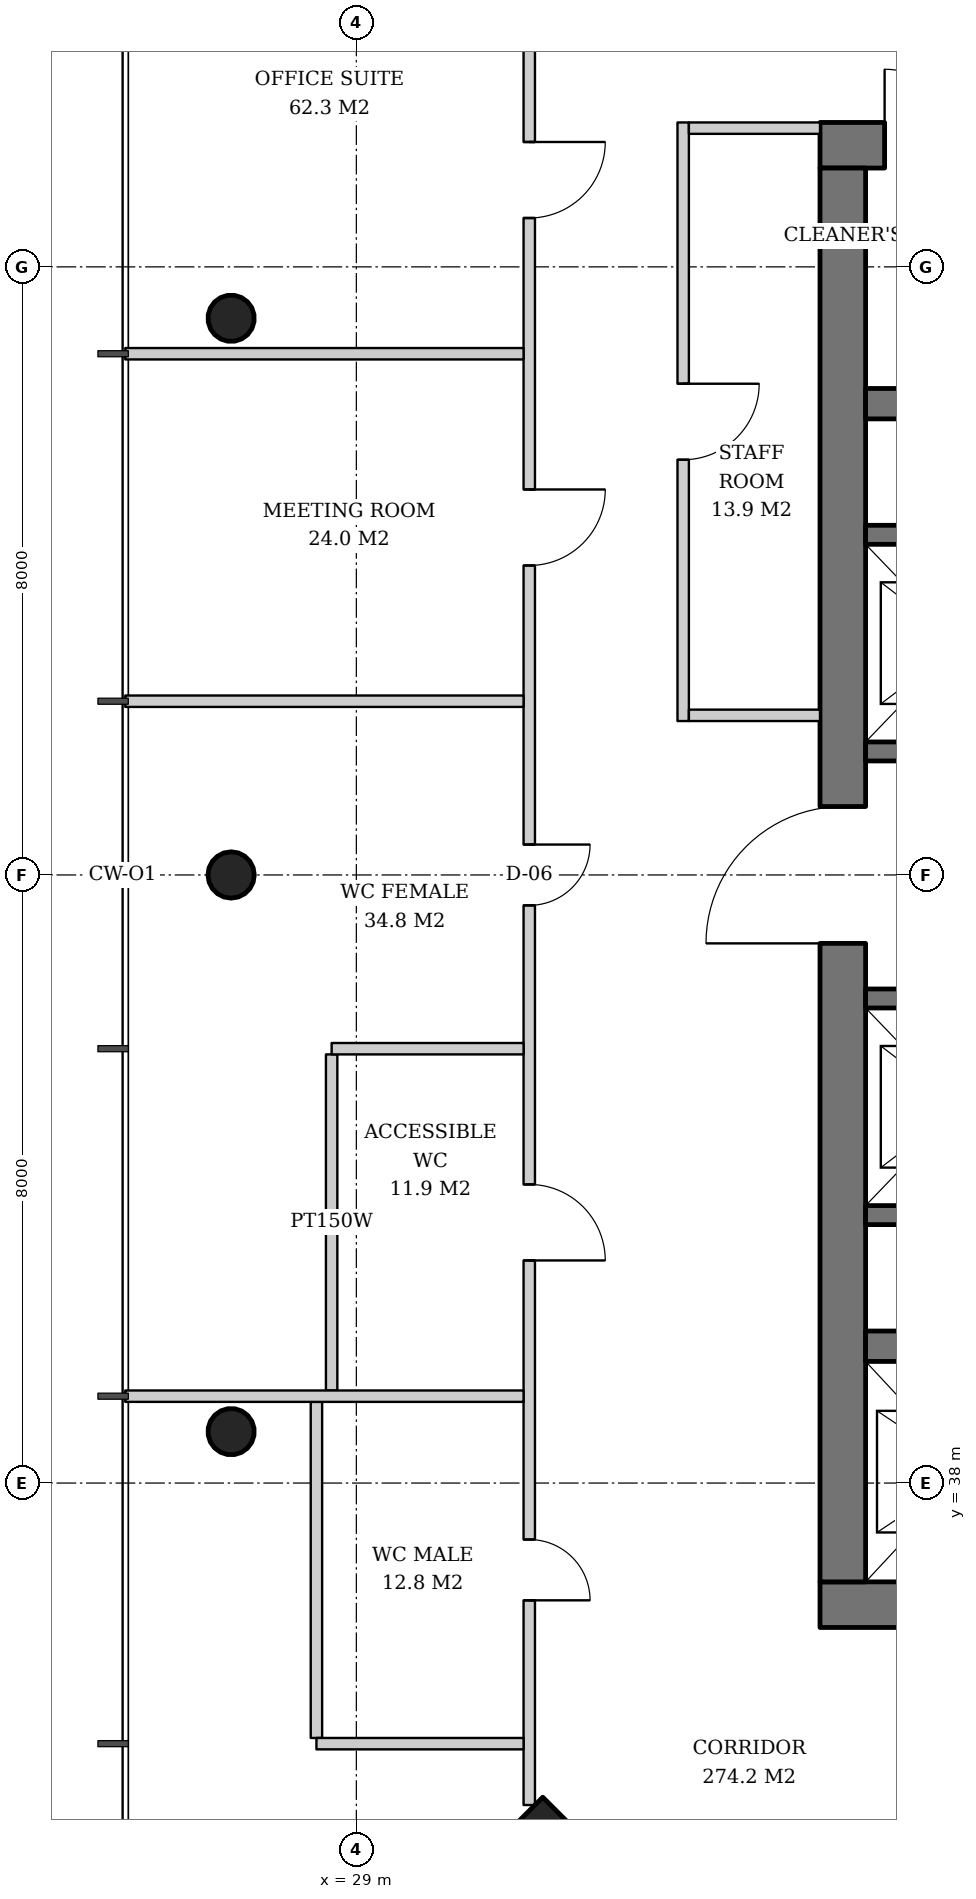
"""IFC4 building model, lengths in metres.
Left out: names, types, materials, properties, quantities, classifications, styles, units other than length and angle.
Written with IfcOpenShell. Run it as: python <this file> out.ifc"""

import sys

from ifc_helpers import new_model, si_unit, direction, frame, frame_2d, origin, origin_2d, place, context, subcontext, project, spatial, rectangle, hollow_circle, extrude, element, fill, save


model = new_model("IFC4")
c1 = context("Model", 3, precision=1e-05, world=origin(), true_north=direction((0.0, 1.0)))
c2 = subcontext(c1, "Body", "Model", "MODEL_VIEW")
j1 = project(units=[si_unit("LENGTHUNIT", "METRE"), si_unit("PLANEANGLEUNIT", "RADIAN")], contexts=[c1])
p1 = place(None, origin())
s1 = spatial("IfcSite", under=j1, at=p1, CompositionType="ELEMENT")
p2 = place(p1, origin())
s2 = spatial("IfcBuilding", under=s1, at=p2, CompositionType="ELEMENT")
p3 = place(p2, frame((0.0, 0.0, 218.6)))
s3 = spatial("IfcBuildingStorey", under=s2, at=p3, CompositionType="ELEMENT", Elevation=218.6)
p4 = place(p3, frame((31.414, 32.414, 0.0), z_axis=(0.031900153262, 0.031900153262, 0.998981861919), x_axis=(-0.707106781187, 0.707106781187, 0.0)))
e1 = element("IfcColumn", 1, at=p4, inside=s3, PredefinedType="COLUMN", context=c2, shape_type="SweptSolid", body=[
    extrude(rectangle(XDim=2.0, YDim=2.0, at=origin_2d()), origin(), (0.0, 0.0, 1.0), 3.804),
])
p5 = place(p3, frame((27.314, 53.343, 0.0), z_axis=(0.031976494272, -0.015924037308, 0.99936176075), x_axis=(0.445775033553, 0.895145027055, 0.0)))
e2 = element("IfcColumn", 2, at=p5, inside=s3, PredefinedType="COLUMN", context=c2, shape_type="SweptSolid", body=[
    extrude(hollow_circle(Radius=0.305, WallThickness=0.025, at=origin_2d()), origin(), (0.0, 0.0, 1.0), 3.802),
])
p6 = place(p3, frame((27.314, 46.0, 0.0), z_axis=(0.031980549263, 0.0, 0.999488491414), x_axis=(0.0, 1.0, 0.0)))
e3 = element("IfcColumn", 3, at=p6, inside=s3, PredefinedType="COLUMN", context=c2, shape_type="SweptSolid", body=[
    extrude(hollow_circle(Radius=0.305, WallThickness=0.025, at=origin_2d()), origin(), (0.0, 0.0, 1.0), 3.802),
])
p7 = place(p3, frame((27.314, 38.657, 0.0), z_axis=(0.031976494272, 0.015924037308, 0.99936176075), x_axis=(-0.445775033553, 0.895145027055, 0.0)))
e4 = element("IfcColumn", 4, at=p7, inside=s3, PredefinedType="COLUMN", context=c2, shape_type="SweptSolid", body=[
    extrude(hollow_circle(Radius=0.305, WallThickness=0.025, at=origin_2d()), origin(), (0.0, 0.0, 1.0), 3.802),
])
p8 = place(p3, frame((35.1, 36.4, 0.0), z_axis=(0.0, 0.0, 1.0), x_axis=(1.0, 0.0, 0.0)))
e5 = element("IfcWall", 5, at=p8, inside=s3, PredefinedType="SHEAR", context=c2, shape_type="SweptSolid", body=[
    extrude(rectangle(XDim=19.8, YDim=0.6, at=frame_2d((9.9, 0.0))), origin(), (0.0, 0.0, 1.0), 3.8),
])
p9 = place(p8, frame((3.9, 0.0, 0.0)))
e6 = element("IfcOpeningElement", 6, at=p9, cuts=e5, PredefinedType="OPENING", context=c2, shape_type="SweptSolid", body=[
    extrude(rectangle(XDim=1.0, YDim=2.1, at=frame_2d((0.5, 1.05))), frame((0.0, 0.31, 0.0), z_axis=(0.0, -1.0, 0.0), x_axis=(1.0, 0.0, 0.0)), (0.0, 0.0, 1.0), 0.62),
])
p10 = place(p8, frame((15.35, 0.0, 0.0)))
e7 = element("IfcOpeningElement", 7, at=p10, cuts=e5, PredefinedType="OPENING", context=c2, shape_type="SweptSolid", body=[
    extrude(rectangle(XDim=1.0, YDim=2.1, at=frame_2d((0.5, 1.05))), frame((0.0, 0.31, 0.0), z_axis=(0.0, -1.0, 0.0), x_axis=(1.0, 0.0, 0.0)), (0.0, 0.0, 1.0), 0.62),
])
p11 = place(p3, frame((35.1, 55.6, 0.0), z_axis=(0.0, 0.0, 1.0), x_axis=(1.0, 0.0, 0.0)))
e8 = element("IfcWall", 8, at=p11, inside=s3, PredefinedType="SHEAR", context=c2, shape_type="SweptSolid", body=[
    extrude(rectangle(XDim=19.8, YDim=0.6, at=frame_2d((9.9, 0.0))), origin(), (0.0, 0.0, 1.0), 3.8),
])
p12 = place(p11, frame((14.54, 0.0, 0.0)))
e9 = element("IfcOpeningElement", 9, at=p12, cuts=e8, PredefinedType="OPENING", context=c2, shape_type="SweptSolid", body=[
    extrude(rectangle(XDim=1.0, YDim=2.1, at=frame_2d((0.5, 1.05))), frame((0.0, 0.31, 0.0), z_axis=(0.0, -1.0, 0.0), x_axis=(1.0, 0.0, 0.0)), (0.0, 0.0, 1.0), 0.62),
])
p13 = place(p11, frame((0.85, 0.0, 0.0)))
e10 = element("IfcOpeningElement", 10, at=p13, cuts=e8, PredefinedType="OPENING", context=c2, shape_type="SweptSolid", body=[
    extrude(rectangle(XDim=1.0, YDim=2.1, at=frame_2d((0.5, 1.05))), frame((0.0, 0.31, 0.0), z_axis=(0.0, -1.0, 0.0), x_axis=(1.0, 0.0, 0.0)), (0.0, 0.0, 1.0), 0.62),
])
p14 = place(p11, frame((2.425, 0.0, 0.0)))
e11 = element("IfcOpeningElement", 11, at=p14, cuts=e8, PredefinedType="OPENING", context=c2, shape_type="SweptSolid", body=[
    extrude(rectangle(XDim=1.0, YDim=2.1, at=frame_2d((0.5, 1.05))), frame((0.0, 0.31, 0.0), z_axis=(0.0, -1.0, 0.0), x_axis=(1.0, 0.0, 0.0)), (0.0, 0.0, 1.0), 0.62),
])
p15 = place(p11, frame((4.012, 0.0, 0.0)))
e12 = element("IfcOpeningElement", 12, at=p15, cuts=e8, PredefinedType="OPENING", context=c2, shape_type="SweptSolid", body=[
    extrude(rectangle(XDim=1.0, YDim=2.1, at=frame_2d((0.5, 1.05))), frame((0.0, 0.31, 0.0), z_axis=(0.0, -1.0, 0.0), x_axis=(1.0, 0.0, 0.0)), (0.0, 0.0, 1.0), 0.62),
])
p16 = place(p3, frame((35.4, 36.7, 0.0), z_axis=(0.0, 0.0, 1.0), x_axis=(0.0, 1.0, 0.0)))
e13 = element("IfcWall", 13, at=p16, inside=s3, PredefinedType="SHEAR", context=c2, shape_type="SweptSolid", body=[
    extrude(rectangle(XDim=18.6, YDim=0.6, at=frame_2d((9.3, 0.0))), origin(), (0.0, 0.0, 1.0), 3.8),
])
p17 = place(p16, frame((8.4, 0.0, 0.0)))
e14 = element("IfcOpeningElement", 14, at=p17, cuts=e13, PredefinedType="OPENING", context=c2, shape_type="SweptSolid", body=[
    extrude(rectangle(XDim=1.8, YDim=2.4, at=frame_2d((0.9, 1.2))), frame((0.0, 0.31, 0.0), z_axis=(0.0, -1.0, 0.0), x_axis=(1.0, 0.0, 0.0)), (0.0, 0.0, 1.0), 0.62),
])
for number, where, z_axis, x_axis in (
    (15, (35.7, 39.8, 0.0), (0.0, 0.0, 1.0), (1.0, 0.0, 0.0)),
    (16, (35.7, 52.2, 0.0), (0.0, 0.0, 1.0), (1.0, 0.0, 0.0)),
):
    element("IfcWall", number, at=place(p3, frame(where, z_axis=z_axis, x_axis=x_axis)), inside=s3, PredefinedType="SHEAR", context=c2, shape_type="SweptSolid", body=[
        extrude(rectangle(XDim=18.6, YDim=0.4, at=frame_2d((9.3, 0.0))), origin(), (0.0, 0.0, 1.0), 3.8),
    ])
p18 = place(p3, frame((35.7, 50.475, 0.0), z_axis=(0.0, 0.0, 1.0), x_axis=(1.0, 0.0, 0.0)))
e17 = element("IfcWall", 17, at=p18, inside=s3, PredefinedType="SHEAR", context=c2, shape_type="SweptSolid", body=[
    extrude(rectangle(XDim=11.0, YDim=0.25, at=frame_2d((5.5, 0.0))), origin(), (0.0, 0.0, 1.0), 3.8),
])
p19 = place(p3, frame((35.7, 47.625, 0.0), z_axis=(0.0, 0.0, 1.0), x_axis=(1.0, 0.0, 0.0)))
e18 = element("IfcWall", 18, at=p19, inside=s3, PredefinedType="SHEAR", context=c2, shape_type="SweptSolid", body=[
    extrude(rectangle(XDim=12.83, YDim=0.25, at=frame_2d((6.415, 0.0))), origin(), (0.0, 0.0, 1.0), 3.8),
])
p20 = place(p19, frame((0.7, 0.0, 0.0)))
e19 = element("IfcOpeningElement", 19, at=p20, cuts=e18, PredefinedType="OPENING", context=c2, shape_type="SweptSolid", body=[
    extrude(rectangle(XDim=1.1, YDim=2.2, at=frame_2d((0.55, 1.1))), frame((0.0, 0.135, 0.0), z_axis=(0.0, -1.0, 0.0), x_axis=(1.0, 0.0, 0.0)), (0.0, 0.0, 1.0), 0.27),
])
p21 = place(p19, frame((3.45, 0.0, 0.0)))
e20 = element("IfcOpeningElement", 20, at=p21, cuts=e18, PredefinedType="OPENING", context=c2, shape_type="SweptSolid", body=[
    extrude(rectangle(XDim=1.1, YDim=2.2, at=frame_2d((0.55, 1.1))), frame((0.0, 0.135, 0.0), z_axis=(0.0, -1.0, 0.0), x_axis=(1.0, 0.0, 0.0)), (0.0, 0.0, 1.0), 0.27),
])
p22 = place(p19, frame((6.2, 0.0, 0.0)))
e21 = element("IfcOpeningElement", 21, at=p22, cuts=e18, PredefinedType="OPENING", context=c2, shape_type="SweptSolid", body=[
    extrude(rectangle(XDim=1.1, YDim=2.2, at=frame_2d((0.55, 1.1))), frame((0.0, 0.135, 0.0), z_axis=(0.0, -1.0, 0.0), x_axis=(1.0, 0.0, 0.0)), (0.0, 0.0, 1.0), 0.27),
])
p23 = place(p19, frame((9.0, 0.0, 0.0)))
e22 = element("IfcOpeningElement", 22, at=p23, cuts=e18, PredefinedType="OPENING", context=c2, shape_type="SweptSolid", body=[
    extrude(rectangle(XDim=1.0, YDim=2.1, at=frame_2d((0.5, 1.05))), frame((0.0, 0.135, 0.0), z_axis=(0.0, -1.0, 0.0), x_axis=(1.0, 0.0, 0.0)), (0.0, 0.0, 1.0), 0.27),
])
p24 = place(p19, frame((11.515, 0.0, 0.0)))
e23 = element("IfcOpeningElement", 23, at=p24, cuts=e18, PredefinedType="OPENING", context=c2, shape_type="SweptSolid", body=[
    extrude(rectangle(XDim=0.8, YDim=2.0, at=frame_2d((0.4, 1.0))), frame((0.0, 0.135, 0.0), z_axis=(0.0, -1.0, 0.0), x_axis=(1.0, 0.0, 0.0)), (0.0, 0.0, 1.0), 0.27),
])
p25 = place(p3, frame((35.7, 41.525, 0.0), z_axis=(0.0, 0.0, 1.0), x_axis=(1.0, 0.0, 0.0)))
e24 = element("IfcWall", 24, at=p25, inside=s3, PredefinedType="SHEAR", context=c2, shape_type="SweptSolid", body=[
    extrude(rectangle(XDim=11.0, YDim=0.25, at=frame_2d((5.5, 0.0))), origin(), (0.0, 0.0, 1.0), 3.8),
])
p26 = place(p3, frame((35.7, 44.375, 0.0), z_axis=(0.0, 0.0, 1.0), x_axis=(1.0, 0.0, 0.0)))
e25 = element("IfcWall", 25, at=p26, inside=s3, PredefinedType="SHEAR", context=c2, shape_type="SweptSolid", body=[
    extrude(rectangle(XDim=12.83, YDim=0.25, at=frame_2d((6.415, 0.0))), origin(), (0.0, 0.0, 1.0), 3.8),
])
p27 = place(p26, frame((0.7, 0.0, 0.0)))
e26 = element("IfcOpeningElement", 26, at=p27, cuts=e25, PredefinedType="OPENING", context=c2, shape_type="SweptSolid", body=[
    extrude(rectangle(XDim=1.1, YDim=2.2, at=frame_2d((0.55, 1.1))), frame((0.0, 0.135, 0.0), z_axis=(0.0, -1.0, 0.0), x_axis=(1.0, 0.0, 0.0)), (0.0, 0.0, 1.0), 0.27),
])
p28 = place(p26, frame((3.45, 0.0, 0.0)))
e27 = element("IfcOpeningElement", 27, at=p28, cuts=e25, PredefinedType="OPENING", context=c2, shape_type="SweptSolid", body=[
    extrude(rectangle(XDim=1.1, YDim=2.2, at=frame_2d((0.55, 1.1))), frame((0.0, 0.135, 0.0), z_axis=(0.0, -1.0, 0.0), x_axis=(1.0, 0.0, 0.0)), (0.0, 0.0, 1.0), 0.27),
])
p29 = place(p26, frame((6.2, 0.0, 0.0)))
e28 = element("IfcOpeningElement", 28, at=p29, cuts=e25, PredefinedType="OPENING", context=c2, shape_type="SweptSolid", body=[
    extrude(rectangle(XDim=1.1, YDim=2.2, at=frame_2d((0.55, 1.1))), frame((0.0, 0.135, 0.0), z_axis=(0.0, -1.0, 0.0), x_axis=(1.0, 0.0, 0.0)), (0.0, 0.0, 1.0), 0.27),
])
p30 = place(p26, frame((9.0, 0.0, 0.0)))
e29 = element("IfcOpeningElement", 29, at=p30, cuts=e25, PredefinedType="OPENING", context=c2, shape_type="SweptSolid", body=[
    extrude(rectangle(XDim=1.0, YDim=2.1, at=frame_2d((0.5, 1.05))), frame((0.0, 0.135, 0.0), z_axis=(0.0, -1.0, 0.0), x_axis=(1.0, 0.0, 0.0)), (0.0, 0.0, 1.0), 0.27),
])
p31 = place(p26, frame((11.515, 0.0, 0.0)))
e30 = element("IfcOpeningElement", 30, at=p31, cuts=e25, PredefinedType="OPENING", context=c2, shape_type="SweptSolid", body=[
    extrude(rectangle(XDim=0.8, YDim=2.0, at=frame_2d((0.4, 1.0))), frame((0.0, 0.135, 0.0), z_axis=(0.0, -1.0, 0.0), x_axis=(1.0, 0.0, 0.0)), (0.0, 0.0, 1.0), 0.27),
])
p32 = place(p3, frame((33.3, 55.9, 0.0), z_axis=(0.0, 0.0, 1.0), x_axis=(0.0, -1.0, 0.0)))
e31 = element("IfcWall", 31, at=p32, inside=s3, PredefinedType="PARTITIONING", context=c2, shape_type="SweptSolid", body=[
    extrude(rectangle(XDim=7.875, YDim=0.15, at=frame_2d((3.938, 0.0))), origin(), (0.0, 0.0, 1.0), 2.867),
])
p33 = place(p32, frame((3.438, 0.0, 0.0)))
e32 = element("IfcOpeningElement", 32, at=p33, cuts=e31, PredefinedType="OPENING", context=c2, shape_type="SweptSolid", body=[
    extrude(rectangle(XDim=1.0, YDim=2.1, at=frame_2d((0.5, 1.05))), frame((0.0, 0.085, 0.0), z_axis=(0.0, -1.0, 0.0), x_axis=(1.0, 0.0, 0.0)), (0.0, 0.0, 1.0), 0.17),
])
p34 = place(p3, frame((35.1, 55.825, 0.0), z_axis=(0.0, 0.0, 1.0), x_axis=(-1.0, 0.0, 0.0)))
e33 = element("IfcWall", 33, at=p34, inside=s3, PredefinedType="PARTITIONING", context=c2, shape_type="SweptSolid", body=[
    extrude(rectangle(XDim=1.725, YDim=0.15, at=frame_2d((0.863, 0.0))), origin(), (0.0, 0.0, 1.0), 2.92),
])
p35 = place(p3, frame((35.1, 48.1, 0.0), z_axis=(0.0, 0.0, 1.0), x_axis=(-1.0, 0.0, 0.0)))
e34 = element("IfcWall", 34, at=p35, inside=s3, PredefinedType="PARTITIONING", context=c2, shape_type="SweptSolid", body=[
    extrude(rectangle(XDim=1.725, YDim=0.15, at=frame_2d((0.863, 0.0))), origin(), (0.0, 0.0, 1.0), 3.62),
])
p36 = place(p3, frame((28.675, 43.639, 0.0), z_axis=(0.0, 0.0, 1.0), x_axis=(0.0, -1.0, 0.0)))
e35 = element("IfcWall", 35, at=p36, inside=s3, PredefinedType="PARTITIONING", context=c2, shape_type="SweptSolid", body=[
    extrude(rectangle(XDim=4.422, YDim=0.15, at=frame_2d((2.211, 0.0))), origin(), (0.0, 0.0, 1.0), 2.867),
])
p37 = place(p3, frame((28.475, 39.068, 0.0), z_axis=(0.0, 0.0, 1.0), x_axis=(0.0, -1.0, 0.0)))
e36 = element("IfcWall", 36, at=p37, inside=s3, PredefinedType="PARTITIONING", context=c2, shape_type="SweptSolid", body=[
    extrude(rectangle(XDim=4.421, YDim=0.15, at=frame_2d((2.211, 0.0))), origin(), (0.0, 0.0, 1.0), 2.867),
])
p38 = place(p3, frame((31.275, 58.236, 0.0), z_axis=(0.0, 0.0, 1.0), x_axis=(0.0, -1.0, 0.0)))
e37 = element("IfcWall", 37, at=p38, inside=s3, PredefinedType="PARTITIONING", context=c2, shape_type="SweptSolid", body=[
    extrude(rectangle(XDim=24.472, YDim=0.15, at=frame_2d((12.236, 0.0))), origin(), (0.0, 0.0, 1.0), 2.867),
])
p39 = place(p38, frame((2.593, 0.0, 0.0)))
e38 = element("IfcOpeningElement", 38, at=p39, cuts=e37, PredefinedType="OPENING", context=c2, shape_type="SweptSolid", body=[
    extrude(rectangle(XDim=1.0, YDim=2.1, at=frame_2d((0.5, 1.05))), frame((0.0, 0.085, 0.0), z_axis=(0.0, -1.0, 0.0), x_axis=(1.0, 0.0, 0.0)), (0.0, 0.0, 1.0), 0.17),
])
p40 = place(p38, frame((7.164, 0.0, 0.0)))
e39 = element("IfcOpeningElement", 39, at=p40, cuts=e37, PredefinedType="OPENING", context=c2, shape_type="SweptSolid", body=[
    extrude(rectangle(XDim=1.0, YDim=2.1, at=frame_2d((0.5, 1.05))), frame((0.0, 0.085, 0.0), z_axis=(0.0, -1.0, 0.0), x_axis=(1.0, 0.0, 0.0)), (0.0, 0.0, 1.0), 0.17),
])
p41 = place(p38, frame((11.836, 0.0, 0.0)))
e40 = element("IfcOpeningElement", 40, at=p41, cuts=e37, PredefinedType="OPENING", context=c2, shape_type="SweptSolid", body=[
    extrude(rectangle(XDim=0.8, YDim=2.1, at=frame_2d((0.4, 1.05))), frame((0.0, 0.085, 0.0), z_axis=(0.0, -1.0, 0.0), x_axis=(1.0, 0.0, 0.0)), (0.0, 0.0, 1.0), 0.17),
])
p42 = place(p38, frame((16.307, 0.0, 0.0)))
e41 = element("IfcOpeningElement", 41, at=p42, cuts=e37, PredefinedType="OPENING", context=c2, shape_type="SweptSolid", body=[
    extrude(rectangle(XDim=1.0, YDim=2.1, at=frame_2d((0.5, 1.05))), frame((0.0, 0.085, 0.0), z_axis=(0.0, -1.0, 0.0), x_axis=(1.0, 0.0, 0.0)), (0.0, 0.0, 1.0), 0.17),
])
p43 = place(p38, frame((20.979, 0.0, 0.0)))
e42 = element("IfcOpeningElement", 42, at=p43, cuts=e37, PredefinedType="OPENING", context=c2, shape_type="SweptSolid", body=[
    extrude(rectangle(XDim=0.8, YDim=2.1, at=frame_2d((0.4, 1.05))), frame((0.0, 0.085, 0.0), z_axis=(0.0, -1.0, 0.0), x_axis=(1.0, 0.0, 0.0)), (0.0, 0.0, 1.0), 0.17),
])
for number, where, z_axis, x_axis in (
    (43, (31.2, 52.857, 0.0), (0.0, 0.0, 1.0), (-1.0, 0.0, 0.0)),
    (44, (31.2, 48.286, 0.0), (0.0, 0.0, 1.0), (-1.0, 0.0, 0.0)),
):
    element("IfcWall", number, at=place(p3, frame(where, z_axis=z_axis, x_axis=x_axis)), inside=s3, PredefinedType="PARTITIONING", context=c2, shape_type="SweptSolid", body=[
        extrude(rectangle(XDim=5.24, YDim=0.15, at=frame_2d((2.62, 0.0))), origin(), (0.0, 0.0, 1.0), 3.12),
    ])
p44 = place(p3, frame((31.2, 43.714, 0.0), z_axis=(0.0, 0.0, 1.0), x_axis=(-1.0, 0.0, 0.0)))
e45 = element("IfcWall", 45, at=p44, inside=s3, PredefinedType="PARTITIONING", context=c2, shape_type="SweptSolid", body=[
    extrude(rectangle(XDim=2.525, YDim=0.15, at=frame_2d((1.262, 0.0))), origin(), (0.0, 0.0, 1.0), 3.62),
])
p45 = place(p3, frame((31.2, 39.143, 0.0), z_axis=(0.0, 0.0, 1.0), x_axis=(-1.0, 0.0, 0.0)))
e46 = element("IfcWall", 46, at=p45, inside=s3, PredefinedType="PARTITIONING", context=c2, shape_type="SweptSolid", body=[
    extrude(rectangle(XDim=5.24, YDim=0.15, at=frame_2d((2.62, 0.0))), origin(), (0.0, 0.0, 1.0), 3.12),
])
p46 = place(p3, frame((31.2, 34.572, 0.0), z_axis=(0.0, 0.0, 1.0), x_axis=(-1.0, 0.0, 0.0)))
e47 = element("IfcWall", 47, at=p46, inside=s3, PredefinedType="PARTITIONING", context=c2, shape_type="SweptSolid", body=[
    extrude(rectangle(XDim=2.725, YDim=0.15, at=frame_2d((1.362, 0.0))), origin(), (0.0, 0.0, 1.0), 3.62),
])
p47 = place(p17, origin())
e48 = element("IfcDoor", 48, at=p47, inside=s3, OperationType="DOUBLE_DOOR_SINGLE_SWING", PredefinedType="DOOR", context=c2, shape_type="SweptSolid", body=[
    extrude(rectangle(XDim=1.8, YDim=2.4, at=frame_2d((0.9, 1.2))), frame((0.0, 0.025, 0.0), z_axis=(0.0, -1.0, 0.0), x_axis=(1.0, 0.0, 0.0)), (0.0, 0.0, 1.0), 0.05),
])
fill(e14, e48)
p48 = place(p13, origin())
e49 = element("IfcDoor", 49, at=p48, inside=s3, OperationType="SINGLE_SWING_LEFT", PredefinedType="DOOR", context=c2, shape_type="SweptSolid", body=[
    extrude(rectangle(XDim=1.0, YDim=2.1, at=frame_2d((0.5, 1.05))), frame((0.0, -0.24, 0.0), z_axis=(0.0, -1.0, 0.0), x_axis=(1.0, 0.0, 0.0)), (0.0, 0.0, 1.0), 0.05),
])
fill(e10, e49)
p49 = place(p33, origin())
e50 = element("IfcDoor", 50, at=p49, inside=s3, OperationType="SINGLE_SWING_LEFT", PredefinedType="DOOR", context=c2, shape_type="SweptSolid", body=[
    extrude(rectangle(XDim=1.0, YDim=2.1, at=frame_2d((0.5, 1.05))), frame((0.0, 0.025, 0.0), z_axis=(0.0, -1.0, 0.0), x_axis=(1.0, 0.0, 0.0)), (0.0, 0.0, 1.0), 0.05),
])
fill(e32, e50)
p50 = place(p39, origin())
e51 = element("IfcDoor", 51, at=p50, inside=s3, OperationType="SINGLE_SWING_LEFT", PredefinedType="DOOR", context=c2, shape_type="SweptSolid", body=[
    extrude(rectangle(XDim=1.0, YDim=2.1, at=frame_2d((0.5, 1.05))), frame((0.0, 0.025, 0.0), z_axis=(0.0, -1.0, 0.0), x_axis=(1.0, 0.0, 0.0)), (0.0, 0.0, 1.0), 0.05),
])
fill(e38, e51)
p51 = place(p40, origin())
e52 = element("IfcDoor", 52, at=p51, inside=s3, OperationType="SINGLE_SWING_LEFT", PredefinedType="DOOR", context=c2, shape_type="SweptSolid", body=[
    extrude(rectangle(XDim=1.0, YDim=2.1, at=frame_2d((0.5, 1.05))), frame((0.0, 0.025, 0.0), z_axis=(0.0, -1.0, 0.0), x_axis=(1.0, 0.0, 0.0)), (0.0, 0.0, 1.0), 0.05),
])
fill(e39, e52)
p52 = place(p41, origin())
e53 = element("IfcDoor", 53, at=p52, inside=s3, OperationType="SINGLE_SWING_LEFT", PredefinedType="DOOR", context=c2, shape_type="SweptSolid", body=[
    extrude(rectangle(XDim=0.8, YDim=2.1, at=frame_2d((0.4, 1.05))), frame((0.0, 0.025, 0.0), z_axis=(0.0, -1.0, 0.0), x_axis=(1.0, 0.0, 0.0)), (0.0, 0.0, 1.0), 0.05),
])
fill(e40, e53)
p53 = place(p42, origin())
e54 = element("IfcDoor", 54, at=p53, inside=s3, OperationType="SINGLE_SWING_RIGHT", PredefinedType="DOOR", context=c2, shape_type="SweptSolid", body=[
    extrude(rectangle(XDim=1.0, YDim=2.1, at=frame_2d((0.5, 1.05))), frame((0.0, 0.025, 0.0), z_axis=(0.0, -1.0, 0.0), x_axis=(1.0, 0.0, 0.0)), (0.0, 0.0, 1.0), 0.05),
])
fill(e41, e54)
p54 = place(p43, origin())
e55 = element("IfcDoor", 55, at=p54, inside=s3, OperationType="SINGLE_SWING_RIGHT", PredefinedType="DOOR", context=c2, shape_type="SweptSolid", body=[
    extrude(rectangle(XDim=0.8, YDim=2.1, at=frame_2d((0.4, 1.05))), frame((0.0, 0.025, 0.0), z_axis=(0.0, -1.0, 0.0), x_axis=(1.0, 0.0, 0.0)), (0.0, 0.0, 1.0), 0.05),
])
fill(e42, e55)
save(model, sys.argv[1])
